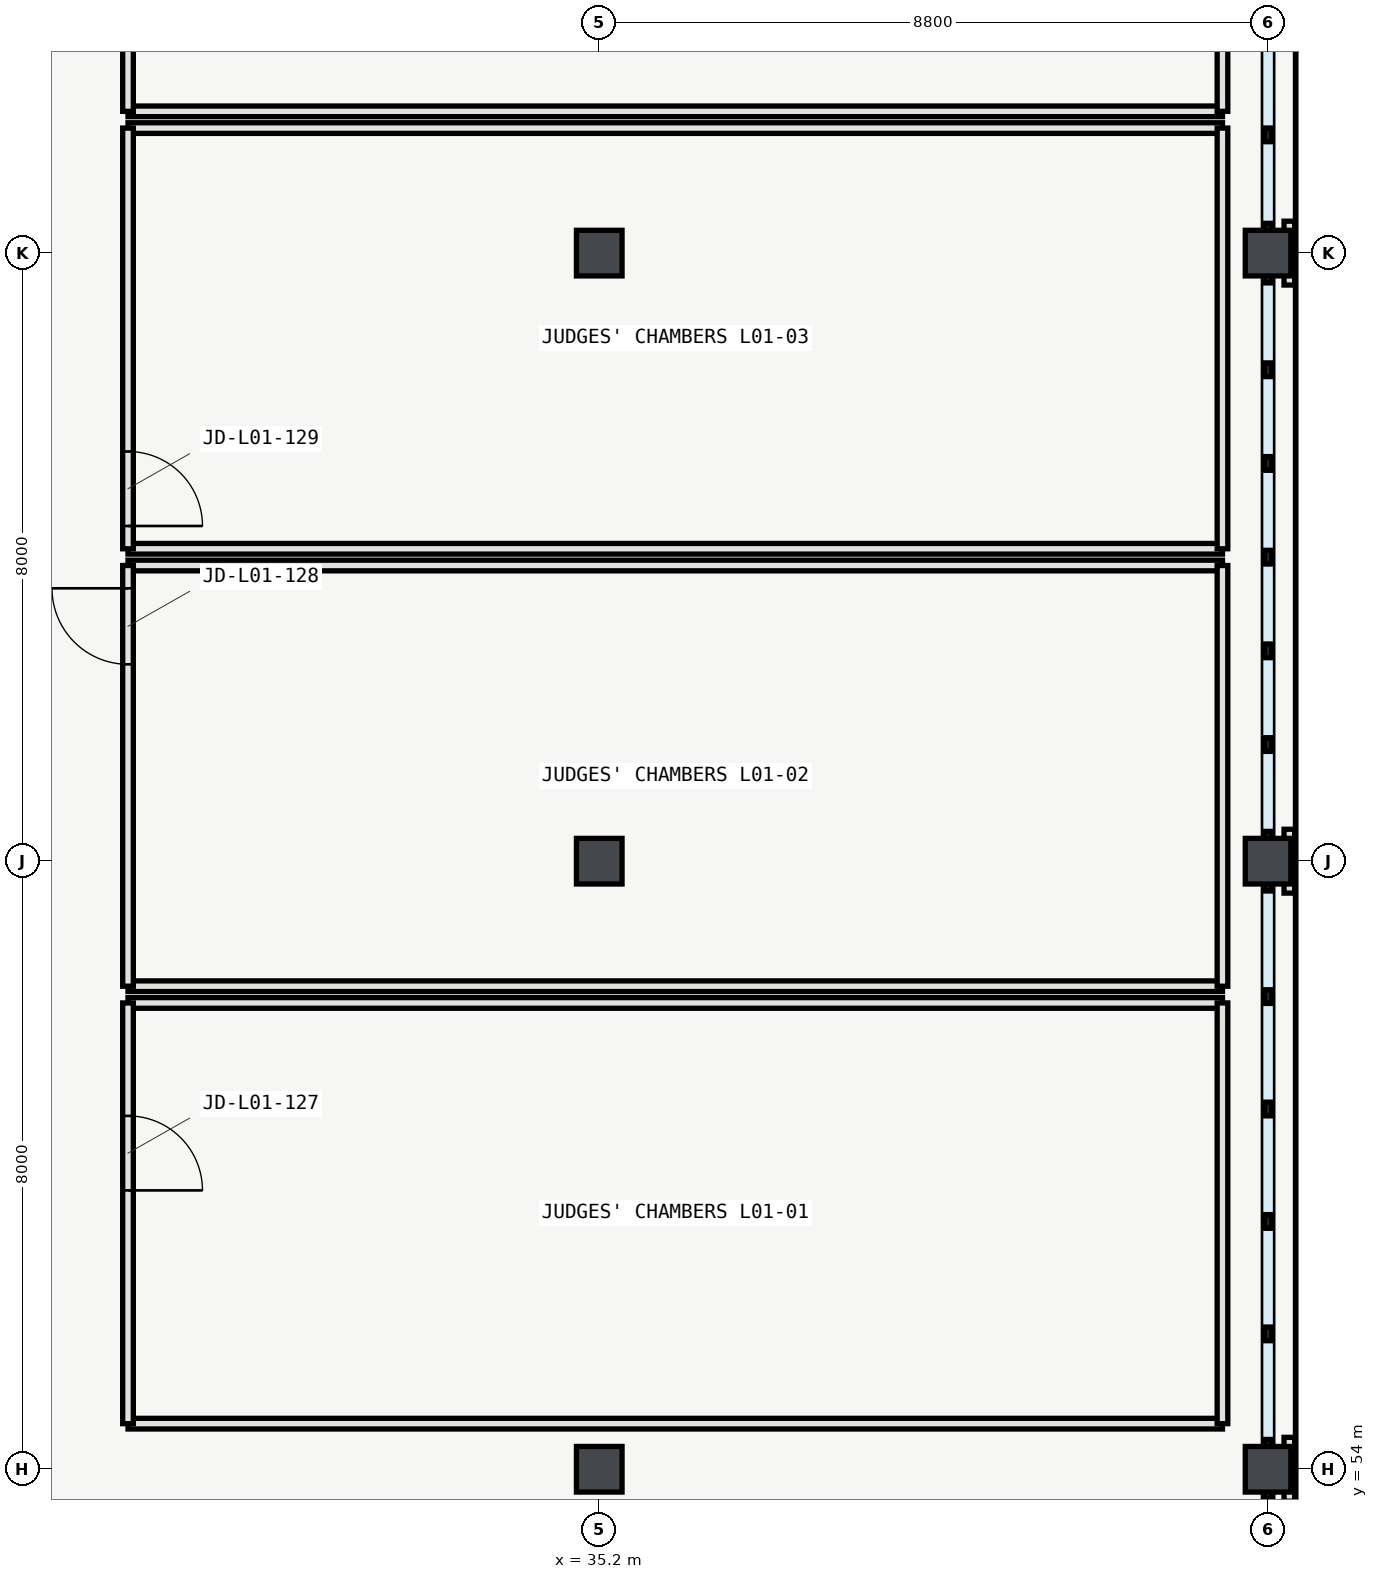
"""IFC4 building model, lengths in metres.
Left out: names, types, materials, properties, quantities, classifications, styles, units other than length and angle.
Written with IfcOpenShell. Run it as: python <this file> out.ifc"""

import sys

from ifc_helpers import new_model, si_unit, direction, frame, frame_2d, origin, origin_2d, place, context, subcontext, project, spatial, rectangle, hollow_rectangle, extrude, element, fill, save


model = new_model("IFC4")
c1 = context("Model", 3, precision=1e-05, world=origin(), true_north=direction((0.0, 1.0)))
c2 = subcontext(c1, "Body", "Model", "MODEL_VIEW")
j1 = project(units=[si_unit("LENGTHUNIT", "METRE"), si_unit("PLANEANGLEUNIT", "RADIAN")], contexts=[c1])
p1 = place(None, origin())
s1 = spatial("IfcSite", under=j1, at=p1, CompositionType="ELEMENT")
p2 = place(p1, origin())
s2 = spatial("IfcBuilding", under=s1, at=p2, CompositionType="ELEMENT")
p3 = place(p2, frame((0.0, 0.0, 5.4)))
s3 = spatial("IfcBuildingStorey", under=s2, at=p3, CompositionType="ELEMENT", Elevation=5.4)
for number, where, z_axis, x_axis in (
    (1, (35.2, 54.0, 0.0), (0.0, 0.0, 1.0), (1.0, 0.0, 0.0)),
    (2, (35.2, 62.0, 0.0), (0.0, 0.0, 1.0), (1.0, 0.0, 0.0)),
    (3, (35.2, 70.0, 0.0), (0.0, 0.0, 1.0), (1.0, 0.0, 0.0)),
    (4, (44.0, 54.0, 0.0), (0.0, 0.0, 1.0), (1.0, 0.0, 0.0)),
    (5, (44.0, 62.0, 0.0), (0.0, 0.0, 1.0), (1.0, 0.0, 0.0)),
    (6, (44.0, 70.0, 0.0), (0.0, 0.0, 1.0), (1.0, 0.0, 0.0)),
):
    element("IfcColumn", number, at=place(p3, frame(where, z_axis=z_axis, x_axis=x_axis)), inside=s3, PredefinedType="COLUMN", context=c2, shape_type="SweptSolid", body=[
        extrude(hollow_rectangle(XDim=0.6, YDim=0.6, WallThickness=0.024, InnerFilletRadius=0.024, OuterFilletRadius=0.048, at=origin_2d()), origin(), (0.0, 0.0, 1.0), 5.4),
    ])
p4 = place(p3, frame((44.44, 30.0, 0.0), z_axis=(0.0, 0.0, 1.0), x_axis=(0.0, 1.0, 0.0)))
e7 = element("IfcWall", 7, at=p4, inside=s3, PredefinedType="SOLIDWALL", context=c2, shape_type="SweptSolid", body=[
    extrude(rectangle(XDim=48.0, YDim=0.16, at=frame_2d((24.0, 0.0))), origin(), (0.0, 0.0, 1.0), 0.58),
])
for number, where, z_axis, x_axis in (
    (8, (44.28, 53.58, 0.0), (0.0, 0.0, 1.0), (0.0, 1.0, 0.0)),
    (9, (44.28, 61.58, 0.0), (0.0, 0.0, 1.0), (0.0, 1.0, 0.0)),
    (10, (44.28, 69.58, 0.0), (0.0, 0.0, 1.0), (0.0, 1.0, 0.0)),
):
    element("IfcWall", number, at=place(p3, frame(where, z_axis=z_axis, x_axis=x_axis)), inside=s3, PredefinedType="SOLIDWALL", context=c2, shape_type="SweptSolid", body=[
        extrude(rectangle(XDim=0.84, YDim=0.14, at=frame_2d((0.42, 0.0))), origin(), (0.0, 0.0, 1.0), 5.14),
    ])
for number, where, z_axis, x_axis in (
    (11, (29.0, 54.6, 0.0), (0.0, 0.0, 1.0), (1.0, 0.0, 0.0)),
    (12, (43.4, 60.135, 0.0), (0.0, 0.0, 1.0), (-1.0, 0.0, 0.0)),
):
    element("IfcWall", number, at=place(p3, frame(where, z_axis=z_axis, x_axis=x_axis)), inside=s3, PredefinedType="PARTITIONING", context=c2, shape_type="SweptSolid", body=[
        extrude(rectangle(XDim=14.4, YDim=0.14, at=frame_2d((7.2, 0.0))), origin(), (0.0, 0.0, 1.0), 5.12),
    ])
p5 = place(p3, frame((29.0, 60.135, 0.0), z_axis=(0.0, 0.0, 1.0), x_axis=(0.0, -1.0, 0.0)))
e13 = element("IfcWall", 13, at=p5, inside=s3, PredefinedType="PARTITIONING", context=c2, shape_type="SweptSolid", body=[
    extrude(rectangle(XDim=5.535, YDim=0.14, at=frame_2d((2.768, 0.0))), origin(), (0.0, 0.0, 1.0), 5.12),
])
p6 = place(p5, frame((1.486, 0.0, 0.0)))
e14 = element("IfcOpeningElement", 14, at=p6, cuts=e13, PredefinedType="OPENING", context=c2, shape_type="SweptSolid", body=[
    extrude(rectangle(XDim=0.98, YDim=2.15, at=frame_2d((0.49, 1.075))), frame((0.0, 0.08, 0.0), z_axis=(0.0, -1.0, 0.0), x_axis=(1.0, 0.0, 0.0)), (0.0, 0.0, 1.0), 0.16),
])
p7 = place(p3, frame((43.4, 54.6, 0.0), z_axis=(0.0, 0.0, 1.0), x_axis=(0.0, 1.0, 0.0)))
e15 = element("IfcWall", 15, at=p7, inside=s3, PredefinedType="PARTITIONING", context=c2, shape_type="SweptSolid", body=[
    extrude(rectangle(XDim=5.535, YDim=0.14, at=frame_2d((2.768, 0.0))), origin(), (0.0, 0.0, 1.0), 5.12),
])
for number, where, z_axis, x_axis in (
    (16, (29.0, 60.355, 0.0), (0.0, 0.0, 1.0), (1.0, 0.0, 0.0)),
    (17, (43.4, 65.89, 0.0), (0.0, 0.0, 1.0), (-1.0, 0.0, 0.0)),
):
    element("IfcWall", number, at=place(p3, frame(where, z_axis=z_axis, x_axis=x_axis)), inside=s3, PredefinedType="PARTITIONING", context=c2, shape_type="SweptSolid", body=[
        extrude(rectangle(XDim=14.4, YDim=0.14, at=frame_2d((7.2, 0.0))), origin(), (0.0, 0.0, 1.0), 5.12),
    ])
p8 = place(p3, frame((29.0, 65.89, 0.0), z_axis=(0.0, 0.0, 1.0), x_axis=(0.0, -1.0, 0.0)))
e18 = element("IfcWall", 18, at=p8, inside=s3, PredefinedType="PARTITIONING", context=c2, shape_type="SweptSolid", body=[
    extrude(rectangle(XDim=5.535, YDim=0.14, at=frame_2d((2.768, 0.0))), origin(), (0.0, 0.0, 1.0), 5.12),
])
p9 = place(p8, frame((0.3, 0.0, 0.0)))
e19 = element("IfcOpeningElement", 19, at=p9, cuts=e18, PredefinedType="OPENING", context=c2, shape_type="SweptSolid", body=[
    extrude(rectangle(XDim=1.0, YDim=2.2, at=frame_2d((0.5, 1.1))), frame((0.0, 0.08, 0.0), z_axis=(0.0, -1.0, 0.0), x_axis=(1.0, 0.0, 0.0)), (0.0, 0.0, 1.0), 0.16),
])
p10 = place(p3, frame((43.4, 60.355, 0.0), z_axis=(0.0, 0.0, 1.0), x_axis=(0.0, 1.0, 0.0)))
e20 = element("IfcWall", 20, at=p10, inside=s3, PredefinedType="PARTITIONING", context=c2, shape_type="SweptSolid", body=[
    extrude(rectangle(XDim=5.535, YDim=0.14, at=frame_2d((2.768, 0.0))), origin(), (0.0, 0.0, 1.0), 5.12),
])
for number, where, z_axis, x_axis in (
    (21, (29.0, 66.11, 0.0), (0.0, 0.0, 1.0), (1.0, 0.0, 0.0)),
    (22, (43.4, 71.645, 0.0), (0.0, 0.0, 1.0), (-1.0, 0.0, 0.0)),
):
    element("IfcWall", number, at=place(p3, frame(where, z_axis=z_axis, x_axis=x_axis)), inside=s3, PredefinedType="PARTITIONING", context=c2, shape_type="SweptSolid", body=[
        extrude(rectangle(XDim=14.4, YDim=0.14, at=frame_2d((7.2, 0.0))), origin(), (0.0, 0.0, 1.0), 5.12),
    ])
p11 = place(p3, frame((29.0, 71.645, 0.0), z_axis=(0.0, 0.0, 1.0), x_axis=(0.0, -1.0, 0.0)))
e23 = element("IfcWall", 23, at=p11, inside=s3, PredefinedType="PARTITIONING", context=c2, shape_type="SweptSolid", body=[
    extrude(rectangle(XDim=5.535, YDim=0.14, at=frame_2d((2.768, 0.0))), origin(), (0.0, 0.0, 1.0), 5.12),
])
p12 = place(p11, frame((4.255, 0.0, 0.0)))
e24 = element("IfcOpeningElement", 24, at=p12, cuts=e23, PredefinedType="OPENING", context=c2, shape_type="SweptSolid", body=[
    extrude(rectangle(XDim=0.98, YDim=2.2, at=frame_2d((0.49, 1.1))), frame((0.0, 0.08, 0.0), z_axis=(0.0, -1.0, 0.0), x_axis=(1.0, 0.0, 0.0)), (0.0, 0.0, 1.0), 0.16),
])
p13 = place(p3, frame((43.4, 66.11, 0.0), z_axis=(0.0, 0.0, 1.0), x_axis=(0.0, 1.0, 0.0)))
e25 = element("IfcWall", 25, at=p13, inside=s3, PredefinedType="PARTITIONING", context=c2, shape_type="SweptSolid", body=[
    extrude(rectangle(XDim=5.535, YDim=0.14, at=frame_2d((2.768, 0.0))), origin(), (0.0, 0.0, 1.0), 5.12),
])
p14 = place(p3, frame((29.0, 71.865, 0.0), z_axis=(0.0, 0.0, 1.0), x_axis=(1.0, 0.0, 0.0)))
e26 = element("IfcWall", 26, at=p14, inside=s3, PredefinedType="PARTITIONING", context=c2, shape_type="SweptSolid", body=[
    extrude(rectangle(XDim=14.4, YDim=0.14, at=frame_2d((7.2, 0.0))), origin(), (0.0, 0.0, 1.0), 5.12),
])
p15 = place(p3, frame((29.0, 77.4, 0.0), z_axis=(0.0, 0.0, 1.0), x_axis=(0.0, -1.0, 0.0)))
e27 = element("IfcWall", 27, at=p15, inside=s3, PredefinedType="PARTITIONING", context=c2, shape_type="SweptSolid", body=[
    extrude(rectangle(XDim=5.535, YDim=0.14, at=frame_2d((2.768, 0.0))), origin(), (0.0, 0.0, 1.0), 5.12),
])
p16 = place(p15, frame((3.055, 0.0, 0.0)))
e28 = element("IfcOpeningElement", 28, at=p16, cuts=e27, PredefinedType="OPENING", context=c2, shape_type="SweptSolid", body=[
    extrude(rectangle(XDim=1.0, YDim=2.15, at=frame_2d((0.5, 1.075))), frame((0.0, 0.08, 0.0), z_axis=(0.0, -1.0, 0.0), x_axis=(1.0, 0.0, 0.0)), (0.0, 0.0, 1.0), 0.16),
])
p17 = place(p3, frame((43.4, 71.865, 0.0), z_axis=(0.0, 0.0, 1.0), x_axis=(0.0, 1.0, 0.0)))
e29 = element("IfcWall", 29, at=p17, inside=s3, PredefinedType="PARTITIONING", context=c2, shape_type="SweptSolid", body=[
    extrude(rectangle(XDim=5.535, YDim=0.14, at=frame_2d((2.768, 0.0))), origin(), (0.0, 0.0, 1.0), 5.12),
])
p18 = place(p6, origin())
e30 = element("IfcDoor", 30, at=p18, inside=s3, OperationType="SINGLE_SWING_RIGHT", PredefinedType="DOOR", context=c2, shape_type="SweptSolid", body=[
    extrude(rectangle(XDim=0.98, YDim=2.15, at=frame_2d((0.49, 1.075))), frame((0.0, 0.025, 0.0), z_axis=(0.0, -1.0, 0.0), x_axis=(1.0, 0.0, 0.0)), (0.0, 0.0, 1.0), 0.05),
])
fill(e14, e30)
p19 = place(p9, origin())
e31 = element("IfcDoor", 31, at=p19, inside=s3, OperationType="SINGLE_SWING_LEFT", PredefinedType="DOOR", context=c2, shape_type="SweptSolid", body=[
    extrude(rectangle(XDim=1.0, YDim=2.2, at=frame_2d((0.5, 1.1))), frame((0.0, 0.025, 0.0), z_axis=(0.0, -1.0, 0.0), x_axis=(1.0, 0.0, 0.0)), (0.0, 0.0, 1.0), 0.05),
])
fill(e19, e31)
p20 = place(p12, origin())
e32 = element("IfcDoor", 32, at=p20, inside=s3, OperationType="SINGLE_SWING_RIGHT", PredefinedType="DOOR", context=c2, shape_type="SweptSolid", body=[
    extrude(rectangle(XDim=0.98, YDim=2.2, at=frame_2d((0.49, 1.1))), frame((0.0, 0.025, 0.0), z_axis=(0.0, -1.0, 0.0), x_axis=(1.0, 0.0, 0.0)), (0.0, 0.0, 1.0), 0.05),
])
fill(e24, e32)
save(model, sys.argv[1])
